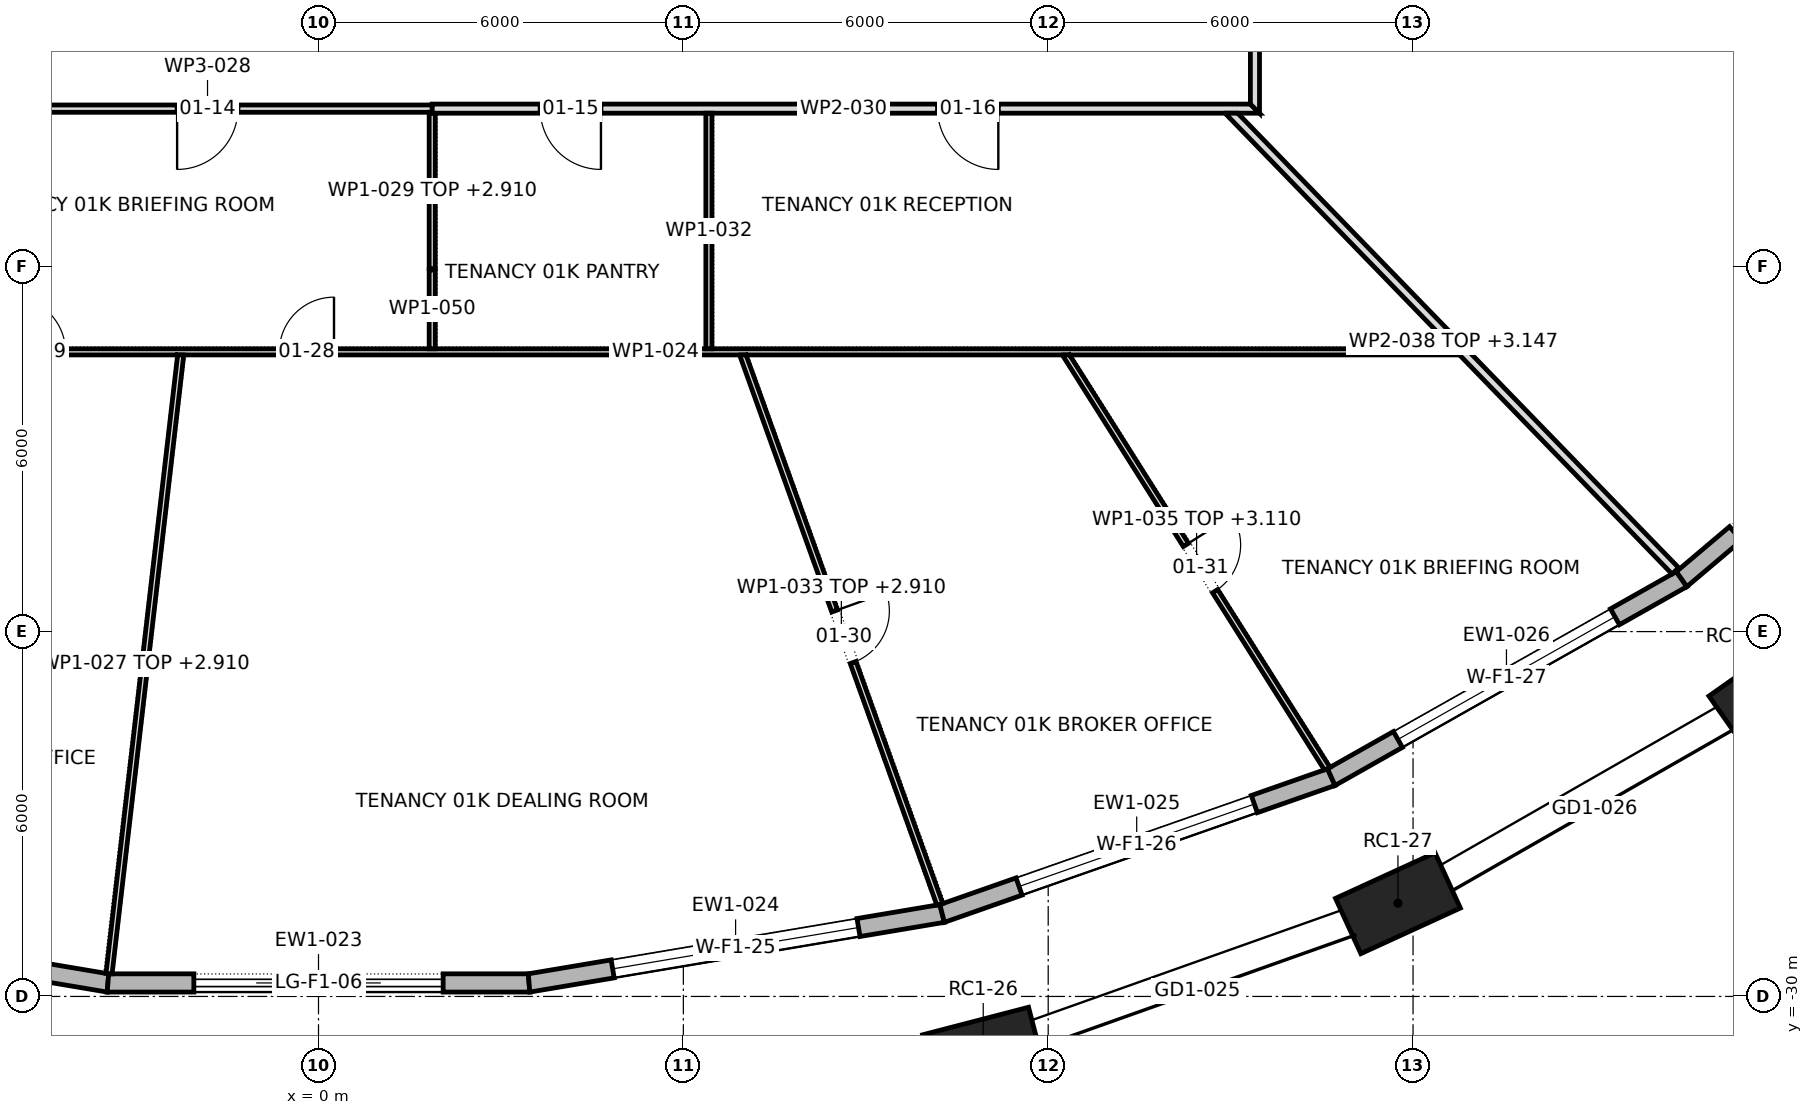
"""IFC4 building model, lengths in metres.
Left out: names, types, materials, properties, quantities, classifications, styles, units other than length and angle.
Written with IfcOpenShell. Run it as: python <this file> out.ifc"""

import sys

from ifc_helpers import new_model, si_unit, direction, frame, frame_2d, origin, origin_2d, place, context, subcontext, project, spatial, polyline, rectangle, outline, extrude, element, fill, save


model = new_model("IFC4")
c1 = context("Model", 3, precision=1e-05, world=origin(), true_north=direction((0.0, 1.0)))
c2 = subcontext(c1, "Body", "Model", "MODEL_VIEW")
j1 = project(units=[si_unit("LENGTHUNIT", "METRE"), si_unit("PLANEANGLEUNIT", "RADIAN")], contexts=[c1])
p1 = place(None, origin())
s1 = spatial("IfcSite", under=j1, at=p1, CompositionType="ELEMENT")
p2 = place(p1, origin())
s2 = spatial("IfcBuilding", under=s1, at=p2, CompositionType="ELEMENT")
p3 = place(p2, frame((0.0, 0.0, 31.9)))
s3 = spatial("IfcBuildingStorey", under=s2, at=p3, CompositionType="ELEMENT", Elevation=31.9)
for number, where, z_axis, x_axis in (
    (1, (10.931, -30.888, 0.0), (0.0, 0.0, 1.0), (0.968, 0.252, 0.0)),
    (2, (17.752, -28.467, 0.0), (0.0, 0.0, 1.0), (0.909, 0.417, 0.0)),
    (3, (23.89, -24.951, 0.0), (0.0, 0.0, 1.0), (0.818, 0.575, 0.0)),
):
    element("IfcColumn", number, at=place(p3, frame(where, z_axis=z_axis, x_axis=x_axis)), inside=s3, PredefinedType="COLUMN", context=c2, shape_type="SweptSolid", body=[
        extrude(rectangle(XDim=1.8, YDim=1.0, at=origin_2d()), origin(), (0.0, 0.0, 1.0), 4.2),
    ])
p4 = place(p3, frame((-10.256, -28.635, 0.0), z_axis=(0.0, 0.0, 1.0), x_axis=(0.986141805867, -0.165904607291, 0.0)))
e4 = element("IfcWall", 4, at=p4, inside=s3, PredefinedType="STANDARD", context=c2, shape_type="SweptSolid", body=[
    extrude(outline(polyline([(-0.013, -0.15), (6.901, -0.15), (6.876, 0.15), (0.013, 0.15), (-0.013, -0.15)])), origin(), (0.0, 0.0, 1.0), 3.9),
])
p5 = place(p4, frame((1.394, 0.0, 0.6)))
e5 = element("IfcOpeningElement", 5, at=p5, cuts=e4, PredefinedType="OPENING", context=c2, shape_type="SweptSolid", body=[
    extrude(rectangle(XDim=4.1, YDim=2.85, at=frame_2d((2.05, 1.425))), frame((0.0, 0.162, 0.0), z_axis=(0.0, -1.0, 0.0), x_axis=(1.0, 0.0, 0.0)), (0.0, 0.0, 1.0), 0.324),
])
p6 = place(p3, frame((-3.463, -29.778, 0.0), z_axis=(0.0, 0.0, 1.0), x_axis=(1.0, 0.0, 0.0)))
e6 = element("IfcWall", 6, at=p6, inside=s3, PredefinedType="STANDARD", context=c2, shape_type="SweptSolid", body=[
    extrude(outline(polyline([(-0.012, -0.15), (6.938, -0.15), (6.913, 0.15), (0.012, 0.15), (-0.012, -0.15)])), origin(), (0.0, 0.0, 1.0), 3.9),
])
p7 = place(p6, frame((1.413, 0.0, 0.0)))
e7 = element("IfcOpeningElement", 7, at=p7, cuts=e6, PredefinedType="OPENING", context=c2, shape_type="SweptSolid", body=[
    extrude(rectangle(XDim=4.1, YDim=3.45, at=frame_2d((2.05, 1.725))), frame((0.0, 0.162, 0.0), z_axis=(0.0, -1.0, 0.0), x_axis=(1.0, 0.0, 0.0)), (0.0, 0.0, 1.0), 0.324),
])
p8 = place(p3, frame((3.463, -29.778, 0.0), z_axis=(0.0, 0.0, 1.0), x_axis=(0.986141805867, 0.165904607291, 0.0)))
e8 = element("IfcWall", 8, at=p8, inside=s3, PredefinedType="STANDARD", context=c2, shape_type="SweptSolid", body=[
    extrude(outline(polyline([(-0.012, -0.15), (6.901, -0.15), (6.876, 0.15), (0.012, 0.15), (-0.012, -0.15)])), origin(), (0.0, 0.0, 1.0), 3.9),
])
p9 = place(p8, frame((1.394, 0.0, 0.6)))
e9 = element("IfcOpeningElement", 9, at=p9, cuts=e8, PredefinedType="OPENING", context=c2, shape_type="SweptSolid", body=[
    extrude(rectangle(XDim=4.1, YDim=2.85, at=frame_2d((2.05, 1.425))), frame((0.0, 0.162, 0.0), z_axis=(0.0, -1.0, 0.0), x_axis=(1.0, 0.0, 0.0)), (0.0, 0.0, 1.0), 0.324),
])
p10 = place(p3, frame((10.256, -28.635, 0.0), z_axis=(0.0, 0.0, 1.0), x_axis=(0.943767392455, 0.330610206947, 0.0)))
e10 = element("IfcWall", 10, at=p10, inside=s3, PredefinedType="STANDARD", context=c2, shape_type="SweptSolid", body=[
    extrude(outline(polyline([(-0.013, -0.15), (6.795, -0.15), (6.768, 0.15), (0.013, 0.15), (-0.013, -0.15)])), origin(), (0.0, 0.0, 1.0), 3.9),
])
p11 = place(p10, frame((1.341, 0.0, 0.6)))
e11 = element("IfcOpeningElement", 11, at=p11, cuts=e10, PredefinedType="OPENING", context=c2, shape_type="SweptSolid", body=[
    extrude(rectangle(XDim=4.1, YDim=2.85, at=frame_2d((2.05, 1.425))), frame((0.0, 0.162, 0.0), z_axis=(0.0, -1.0, 0.0), x_axis=(1.0, 0.0, 0.0)), (0.0, 0.0, 1.0), 0.324),
])
p12 = place(p3, frame((16.656, -26.393, 0.0), z_axis=(0.0, 0.0, 1.0), x_axis=(0.8705786416, 0.492029296678, 0.0)))
e12 = element("IfcWall", 12, at=p12, inside=s3, PredefinedType="STANDARD", context=c2, shape_type="SweptSolid", body=[
    extrude(outline(polyline([(-0.013, -0.15), (6.632, -0.15), (6.604, 0.15), (0.013, 0.15), (-0.013, -0.15)])), origin(), (0.0, 0.0, 1.0), 3.9),
])
p13 = place(p12, frame((1.259, 0.0, 0.6)))
e13 = element("IfcOpeningElement", 13, at=p13, cuts=e12, PredefinedType="OPENING", context=c2, shape_type="SweptSolid", body=[
    extrude(rectangle(XDim=4.1, YDim=2.85, at=frame_2d((2.05, 1.425))), frame((0.0, 0.162, 0.0), z_axis=(0.0, -1.0, 0.0), x_axis=(1.0, 0.0, 0.0)), (0.0, 0.0, 1.0), 0.324),
])
p14 = place(p3, frame((22.417, -23.137, 0.0), z_axis=(0.0, 0.0, 1.0), x_axis=(0.763540615407, 0.645759807223, 0.0)))
e14 = element("IfcWall", 14, at=p14, inside=s3, PredefinedType="STANDARD", context=c2, shape_type="SweptSolid", body=[
    extrude(outline(polyline([(-0.014, -0.15), (6.435, -0.15), (6.405, 0.15), (0.014, 0.15), (-0.014, -0.15)])), origin(), (0.0, 0.0, 1.0), 3.9),
])
p15 = place(p14, frame((1.16, 0.0, 0.0)))
e15 = element("IfcOpeningElement", 15, at=p15, cuts=e14, PredefinedType="OPENING", context=c2, shape_type="SweptSolid", body=[
    extrude(rectangle(XDim=4.1, YDim=3.45, at=frame_2d((2.05, 1.725))), frame((0.0, 0.162, 0.0), z_axis=(0.0, -1.0, 0.0), x_axis=(1.0, 0.0, 0.0)), (0.0, 0.0, 1.0), 0.324),
])
p16 = place(p3, frame((-6.894, -19.4, 0.0), z_axis=(0.0, 0.0, 1.0), x_axis=(1.0, 0.0, 0.0)))
e16 = element("IfcWall", 16, at=p16, inside=s3, PredefinedType="PARTITIONING", context=c2, shape_type="SweptSolid", body=[
    extrude(outline(polyline([(0.0, -0.05), (1.526, -0.05), (3.052, -0.05), (4.578, -0.05), (4.578, -0.049), (4.587, -0.05), (6.454, -0.05), (8.321, -0.05), (10.188, -0.05), (12.055, -0.05), (13.922, -0.05), (13.925, -0.049), (13.925, -0.05), (15.696, -0.05), (17.468, -0.05), (19.239, -0.05), (19.243, -0.047), (19.245, -0.05), (20.848, -0.05), (22.451, -0.05), (24.054, -0.05), (25.657, -0.05), (25.657, -0.05), (25.614, -0.005), (25.614, -0.005), (25.561, 0.05), (23.819, 0.05), (22.076, 0.05), (20.334, 0.05), (18.591, 0.05), (16.849, 0.05), (15.106, 0.05), (13.364, 0.05), (13.364, 0.05), (13.264, 0.05), (13.264, 0.05), (11.781, 0.05), (10.297, 0.05), (8.814, 0.05), (8.814, 0.05), (8.714, 0.05), (8.714, 0.05), (6.978, 0.05), (5.243, 0.05), (3.507, 0.05), (1.771, 0.05), (0.036, 0.05), (0.0, -0.049), (0.0, -0.05)])), origin(), (0.0, 0.0, 1.0), 3.9),
])
p17 = place(p16, frame((6.249, 0.0, 0.0)))
e17 = element("IfcOpeningElement", 17, at=p17, cuts=e16, PredefinedType="OPENING", context=c2, shape_type="SweptSolid", body=[
    extrude(rectangle(XDim=0.9, YDim=2.1, at=frame_2d((0.45, 1.05))), frame((0.0, 0.062, 0.0), z_axis=(0.0, -1.0, 0.0), x_axis=(1.0, 0.0, 0.0)), (0.0, 0.0, 1.0), 0.124),
])
p18 = place(p16, frame((1.834, 0.0, 0.0)))
e18 = element("IfcOpeningElement", 18, at=p18, cuts=e16, PredefinedType="OPENING", context=c2, shape_type="SweptSolid", body=[
    extrude(rectangle(XDim=0.9, YDim=2.1, at=frame_2d((0.45, 1.05))), frame((0.0, 0.062, 0.0), z_axis=(0.0, -1.0, 0.0), x_axis=(1.0, 0.0, 0.0)), (0.0, 0.0, 1.0), 0.124),
])
p19 = place(p3, frame((-3.445, -29.626, 0.0), z_axis=(0.0, 0.0, 1.0), x_axis=(0.115096942751, 0.993354263981, 0.0)))
e19 = element("IfcWall", 19, at=p19, inside=s3, PredefinedType="PARTITIONING", context=c2, shape_type="SweptSolid", body=[
    extrude(outline(polyline([(10.25, -0.05), (10.25, -0.047), (10.238, 0.05), (8.532, 0.05), (6.825, 0.05), (5.119, 0.05), (3.413, 0.05), (1.706, 0.05), (0.0, 0.05), (0.0, -0.018), (0.004, -0.05), (1.711, -0.05), (3.419, -0.05), (5.127, -0.05), (6.834, -0.05), (8.542, -0.05), (10.25, -0.05)])), origin(), (0.0, 0.0, 1.0), 2.91),
])
p20 = place(p3, frame((1.87, -15.4, 0.0), z_axis=(0.0, 0.0, 1.0), x_axis=(-1.0, 0.0, 0.0)))
e20 = element("IfcWall", 20, at=p20, inside=s3, PredefinedType="PARTITIONING", context=c2, shape_type="SweptSolid", body=[
    extrude(rectangle(XDim=7.39, YDim=0.12, at=frame_2d((3.695, 0.0))), origin(), (0.0, 0.0, 1.0), 3.9),
])
p21 = place(p20, frame((3.195, 0.0, 0.0)))
e21 = element("IfcOpeningElement", 21, at=p21, cuts=e20, PredefinedType="OPENING", context=c2, shape_type="SweptSolid", body=[
    extrude(rectangle(XDim=1.0, YDim=2.1, at=frame_2d((0.5, 1.05))), frame((0.0, 0.072, 0.0), z_axis=(0.0, -1.0, 0.0), x_axis=(1.0, 0.0, 0.0)), (0.0, 0.0, 1.0), 0.144),
])
p22 = place(p3, frame((1.87, -15.46, 0.0), z_axis=(0.0, 0.0, 1.0), x_axis=(0.0, -1.0, 0.0)))
e22 = element("IfcWall", 22, at=p22, inside=s3, PredefinedType="PARTITIONING", context=c2, shape_type="SweptSolid", body=[
    extrude(outline(polyline([(2.583, 0.05), (1.299, 0.05), (0.015, 0.05), (0.015, 0.0), (0.0, 0.0), (0.0, -0.05), (1.292, -0.05), (2.583, -0.05), (2.583, 0.05)])), origin(), (0.0, 0.0, 1.0), 2.91),
])
p23 = place(p3, frame((1.87, -15.4, 0.0), z_axis=(0.0, 0.0, 1.0), x_axis=(1.0, 0.0, 0.0)))
e23 = element("IfcWall", 23, at=p23, inside=s3, PredefinedType="PARTITIONING", context=c2, shape_type="SweptSolid", body=[
    extrude(outline(polyline([(0.0, -0.075), (1.944, -0.075), (3.887, -0.075), (5.831, -0.075), (7.774, -0.075), (9.718, -0.075), (11.661, -0.075), (13.605, -0.075), (13.455, 0.075), (11.533, 0.075), (9.611, 0.075), (7.688, 0.075), (5.766, 0.075), (3.844, 0.075), (1.922, 0.075), (0.0, 0.075), (0.0, -0.075)])), origin(), (0.0, 0.0, 1.0), 3.9),
])
p24 = place(p23, frame((1.775, 0.0, 0.0)))
e24 = element("IfcOpeningElement", 24, at=p24, cuts=e23, PredefinedType="OPENING", context=c2, shape_type="SweptSolid", body=[
    extrude(rectangle(XDim=1.0, YDim=2.1, at=frame_2d((0.5, 1.05))), frame((0.0, 0.087, 0.0), z_axis=(0.0, -1.0, 0.0), x_axis=(1.0, 0.0, 0.0)), (0.0, 0.0, 1.0), 0.174),
])
p25 = place(p23, frame((8.31, 0.0, 0.0)))
e25 = element("IfcOpeningElement", 25, at=p25, cuts=e23, PredefinedType="OPENING", context=c2, shape_type="SweptSolid", body=[
    extrude(rectangle(XDim=1.0, YDim=2.1, at=frame_2d((0.5, 1.05))), frame((0.0, 0.087, 0.0), z_axis=(0.0, -1.0, 0.0), x_axis=(1.0, 0.0, 0.0)), (0.0, 0.0, 1.0), 0.174),
])
p26 = place(p3, frame((6.42, -15.475, 0.0), z_axis=(0.0, 0.0, 1.0), x_axis=(0.0, -1.0, 0.0)))
e26 = element("IfcWall", 26, at=p26, inside=s3, PredefinedType="PARTITIONING", context=c2, shape_type="SweptSolid", body=[
    extrude(rectangle(XDim=3.875, YDim=0.1, at=frame_2d((1.938, 0.0))), origin(), (0.0, 0.0, 1.0), 3.9),
])
p27 = place(p3, frame((6.972, -19.433, 0.0), z_axis=(0.0, 0.0, 1.0), x_axis=(0.337548274923, -0.941308218437, 0.0)))
e27 = element("IfcWall", 27, at=p27, inside=s3, PredefinedType="PARTITIONING", context=c2, shape_type="SweptSolid", body=[
    extrude(outline(polyline([(0.0, -0.05), (1.922, -0.05), (3.845, -0.05), (5.767, -0.05), (7.689, -0.05), (9.612, -0.05), (9.62, -0.001), (9.62, 0.002), (9.62, 0.05), (7.703, 0.05), (5.786, 0.05), (3.87, 0.05), (1.953, 0.05), (0.036, 0.05), (0.0, -0.049), (0.0, -0.05)])), origin(), (0.0, 0.0, 1.0), 2.91),
])
p28 = place(p27, frame((4.492, 0.0, 0.0)))
e28 = element("IfcOpeningElement", 28, at=p28, cuts=e27, PredefinedType="OPENING", context=c2, shape_type="SweptSolid", body=[
    extrude(rectangle(XDim=0.9, YDim=2.1, at=frame_2d((0.45, 1.05))), frame((0.0, 0.062, 0.0), z_axis=(0.0, -1.0, 0.0), x_axis=(1.0, 0.0, 0.0)), (0.0, 0.0, 1.0), 0.124),
])
p29 = place(p3, frame((12.275, -19.424, 0.0), z_axis=(0.0, 0.0, 1.0), x_axis=(0.533945273126, -0.845519038997, 0.0)))
e29 = element("IfcWall", 29, at=p29, inside=s3, PredefinedType="PARTITIONING", context=c2, shape_type="SweptSolid", body=[
    extrude(outline(polyline([(0.0, -0.05), (1.614, -0.05), (3.228, -0.05), (4.842, -0.05), (6.456, -0.05), (8.071, -0.05), (8.083, 0.003), (8.085, 0.05), (8.085, 0.05), (6.48, 0.05), (4.876, 0.05), (3.272, 0.05), (1.667, 0.05), (0.063, 0.05), (0.0, -0.05), (0.0, -0.05)])), origin(), (0.0, 0.0, 1.0), 3.11),
])
p30 = place(p29, frame((3.727, 0.0, 0.0)))
e30 = element("IfcOpeningElement", 30, at=p30, cuts=e29, PredefinedType="OPENING", context=c2, shape_type="SweptSolid", body=[
    extrude(rectangle(XDim=0.9, YDim=2.1, at=frame_2d((0.45, 1.05))), frame((0.0, 0.062, 0.0), z_axis=(0.0, -1.0, 0.0), x_axis=(1.0, 0.0, 0.0)), (0.0, 0.0, 1.0), 0.124),
])
p31 = place(p3, frame((14.962, -15.423, 0.0), z_axis=(0.0, 0.0, 1.0), x_axis=(0.69624947088, -0.717799884578, 0.0)))
e31 = element("IfcWall", 31, at=p31, inside=s3, PredefinedType="PARTITIONING", context=c2, shape_type="SweptSolid", body=[
    extrude(outline(polyline([(0.0, -0.075), (1.799, -0.075), (3.599, -0.075), (5.398, -0.075), (5.465, -0.006), (5.537, -0.075), (7.21, -0.075), (8.884, -0.075), (10.558, -0.075), (10.558, -0.073), (10.558, 0.075), (8.823, 0.075), (7.087, 0.075), (5.352, 0.075), (3.616, 0.075), (1.881, 0.075), (0.145, 0.075), (0.0, -0.074), (0.0, -0.075)])), origin(), (0.0, 0.0, 1.0), 3.147),
])
p32 = place(p3, frame((15.4, -15.475, 0.0), z_axis=(0.0, 0.0, 1.0), x_axis=(0.0, 1.0, 0.0)))
e32 = element("IfcWall", 32, at=p32, inside=s3, PredefinedType="PARTITIONING", context=c2, shape_type="SweptSolid", body=[
    extrude(outline(polyline([(26.165, 0.075), (24.307, 0.075), (22.449, 0.075), (20.59, 0.075), (18.732, 0.075), (16.874, 0.075), (15.016, 0.075), (13.158, 0.075), (11.299, 0.075), (9.441, 0.075), (7.583, 0.075), (5.725, 0.075), (3.866, 0.075), (2.008, 0.075), (0.15, 0.075), (0.0, -0.075), (1.869, -0.075), (3.738, -0.075), (5.607, -0.075), (7.476, -0.075), (9.345, -0.075), (11.214, -0.075), (13.083, -0.075), (14.952, -0.075), (16.821, -0.075), (18.689, -0.075), (20.558, -0.075), (22.427, -0.075), (24.296, -0.075), (26.165, -0.075), (26.165, 0.075)])), origin(), (0.0, 0.0, 1.0), 3.9),
])
p33 = place(p32, frame((4.9, 0.0, 0.0)))
e33 = element("IfcOpeningElement", 33, at=p33, cuts=e32, PredefinedType="OPENING", context=c2, shape_type="SweptSolid", body=[
    extrude(rectangle(XDim=1.8, YDim=2.1, at=frame_2d((0.9, 1.05))), frame((0.0, 0.087, 0.0), z_axis=(0.0, -1.0, 0.0), x_axis=(1.0, 0.0, 0.0)), (0.0, 0.0, 1.0), 0.174),
])
p34 = place(p32, frame((14.975, 0.0, 0.0)))
e34 = element("IfcOpeningElement", 34, at=p34, cuts=e32, PredefinedType="OPENING", context=c2, shape_type="SweptSolid", body=[
    extrude(rectangle(XDim=1.0, YDim=2.1, at=frame_2d((0.5, 1.05))), frame((0.0, 0.087, 0.0), z_axis=(0.0, -1.0, 0.0), x_axis=(1.0, 0.0, 0.0)), (0.0, 0.0, 1.0), 0.174),
])
p35 = place(p32, frame((22.295, 0.0, 0.0)))
e35 = element("IfcOpeningElement", 35, at=p35, cuts=e32, PredefinedType="OPENING", context=c2, shape_type="SweptSolid", body=[
    extrude(rectangle(XDim=1.0, YDim=2.1, at=frame_2d((0.5, 1.05))), frame((0.0, 0.087, 0.0), z_axis=(0.0, -1.0, 0.0), x_axis=(1.0, 0.0, 0.0)), (0.0, 0.0, 1.0), 0.174),
])
p36 = place(p3, frame((1.87, -18.043, 0.0), z_axis=(0.0, 0.0, 1.0), x_axis=(0.0, -1.0, 0.0)))
e36 = element("IfcWall", 36, at=p36, inside=s3, PredefinedType="PARTITIONING", context=c2, shape_type="SweptSolid", body=[
    extrude(outline(polyline([(0.0, -0.05), (1.307, -0.05), (1.307, 0.05), (0.0, 0.05), (0.0, -0.05)])), origin(), (0.0, 0.0, 1.0), 3.9),
])
p37 = place(p7, origin())
e37 = element("IfcDoor", 37, at=p37, inside=s3, OperationType="DOUBLE_DOOR_SLIDING", PredefinedType="DOOR", context=c2, shape_type="SweptSolid", body=[
    extrude(rectangle(XDim=4.1, YDim=3.45, at=frame_2d((2.05, 1.725))), frame((0.0, 0.025, 0.0), z_axis=(0.0, -1.0, 0.0), x_axis=(1.0, 0.0, 0.0)), (0.0, 0.0, 1.0), 0.05),
])
fill(e7, e37)
p38 = place(p9, origin())
e38 = element("IfcWindow", 38, at=p38, inside=s3, PartitioningType="TRIPLE_PANEL_VERTICAL", PredefinedType="WINDOW", context=c2, shape_type="SweptSolid", body=[
    extrude(rectangle(XDim=4.1, YDim=2.85, at=frame_2d((2.05, 1.425))), frame((0.0, 0.03, 0.0), z_axis=(0.0, -1.0, 0.0), x_axis=(1.0, 0.0, 0.0)), (0.0, 0.0, 1.0), 0.06),
])
fill(e9, e38)
p39 = place(p11, origin())
e39 = element("IfcWindow", 39, at=p39, inside=s3, PartitioningType="TRIPLE_PANEL_VERTICAL", PredefinedType="WINDOW", context=c2, shape_type="SweptSolid", body=[
    extrude(rectangle(XDim=4.1, YDim=2.85, at=frame_2d((2.05, 1.425))), frame((0.0, 0.03, 0.0), z_axis=(0.0, -1.0, 0.0), x_axis=(1.0, 0.0, 0.0)), (0.0, 0.0, 1.0), 0.06),
])
fill(e11, e39)
p40 = place(p13, origin())
e40 = element("IfcWindow", 40, at=p40, inside=s3, PartitioningType="TRIPLE_PANEL_VERTICAL", PredefinedType="WINDOW", context=c2, shape_type="SweptSolid", body=[
    extrude(rectangle(XDim=4.1, YDim=2.85, at=frame_2d((2.05, 1.425))), frame((0.0, 0.03, 0.0), z_axis=(0.0, -1.0, 0.0), x_axis=(1.0, 0.0, 0.0)), (0.0, 0.0, 1.0), 0.06),
])
fill(e13, e40)
p41 = place(p21, origin())
e41 = element("IfcDoor", 41, at=p41, inside=s3, OperationType="SINGLE_SWING_LEFT", PredefinedType="DOOR", context=c2, shape_type="SweptSolid", body=[
    extrude(rectangle(XDim=1.0, YDim=2.1, at=frame_2d((0.5, 1.05))), frame((0.0, 0.025, 0.0), z_axis=(0.0, -1.0, 0.0), x_axis=(1.0, 0.0, 0.0)), (0.0, 0.0, 1.0), 0.05),
])
fill(e21, e41)
p42 = place(p24, frame((1.0, 0.0, 0.0), z_axis=(0.0, 0.0, 1.0), x_axis=(-1.0, 0.0, 0.0)))
e42 = element("IfcDoor", 42, at=p42, inside=s3, OperationType="SINGLE_SWING_RIGHT", PredefinedType="DOOR", context=c2, shape_type="SweptSolid", body=[
    extrude(rectangle(XDim=1.0, YDim=2.1, at=frame_2d((0.5, 1.05))), frame((0.0, 0.025, 0.0), z_axis=(0.0, -1.0, 0.0), x_axis=(1.0, 0.0, 0.0)), (0.0, 0.0, 1.0), 0.05),
])
fill(e24, e42)
p43 = place(p25, frame((1.0, 0.0, 0.0), z_axis=(0.0, 0.0, 1.0), x_axis=(-1.0, 0.0, 0.0)))
e43 = element("IfcDoor", 43, at=p43, inside=s3, OperationType="SINGLE_SWING_RIGHT", PredefinedType="DOOR", context=c2, shape_type="SweptSolid", body=[
    extrude(rectangle(XDim=1.0, YDim=2.1, at=frame_2d((0.5, 1.05))), frame((0.0, 0.025, 0.0), z_axis=(0.0, -1.0, 0.0), x_axis=(1.0, 0.0, 0.0)), (0.0, 0.0, 1.0), 0.05),
])
fill(e25, e43)
p44 = place(p17, origin())
e44 = element("IfcDoor", 44, at=p44, inside=s3, OperationType="SINGLE_SWING_LEFT", PredefinedType="DOOR", context=c2, shape_type="SweptSolid", body=[
    extrude(rectangle(XDim=0.9, YDim=2.1, at=frame_2d((0.45, 1.05))), frame((0.0, 0.025, 0.0), z_axis=(0.0, -1.0, 0.0), x_axis=(1.0, 0.0, 0.0)), (0.0, 0.0, 1.0), 0.05),
])
fill(e17, e44)
p45 = place(p18, origin())
e45 = element("IfcDoor", 45, at=p45, inside=s3, OperationType="SINGLE_SWING_RIGHT", PredefinedType="DOOR", context=c2, shape_type="SweptSolid", body=[
    extrude(rectangle(XDim=0.9, YDim=2.1, at=frame_2d((0.45, 1.05))), frame((0.0, 0.025, 0.0), z_axis=(0.0, -1.0, 0.0), x_axis=(1.0, 0.0, 0.0)), (0.0, 0.0, 1.0), 0.05),
])
fill(e18, e45)
p46 = place(p28, origin())
e46 = element("IfcDoor", 46, at=p46, inside=s3, OperationType="SINGLE_SWING_RIGHT", PredefinedType="DOOR", context=c2, shape_type="SweptSolid", body=[
    extrude(rectangle(XDim=0.9, YDim=2.1, at=frame_2d((0.45, 1.05))), frame((0.0, 0.025, 0.0), z_axis=(0.0, -1.0, 0.0), x_axis=(1.0, 0.0, 0.0)), (0.0, 0.0, 1.0), 0.05),
])
fill(e28, e46)
p47 = place(p30, origin())
e47 = element("IfcDoor", 47, at=p47, inside=s3, OperationType="SINGLE_SWING_RIGHT", PredefinedType="DOOR", context=c2, shape_type="SweptSolid", body=[
    extrude(rectangle(XDim=0.9, YDim=2.1, at=frame_2d((0.45, 1.05))), frame((0.0, 0.025, 0.0), z_axis=(0.0, -1.0, 0.0), x_axis=(1.0, 0.0, 0.0)), (0.0, 0.0, 1.0), 0.05),
])
fill(e30, e47)
save(model, sys.argv[1])
